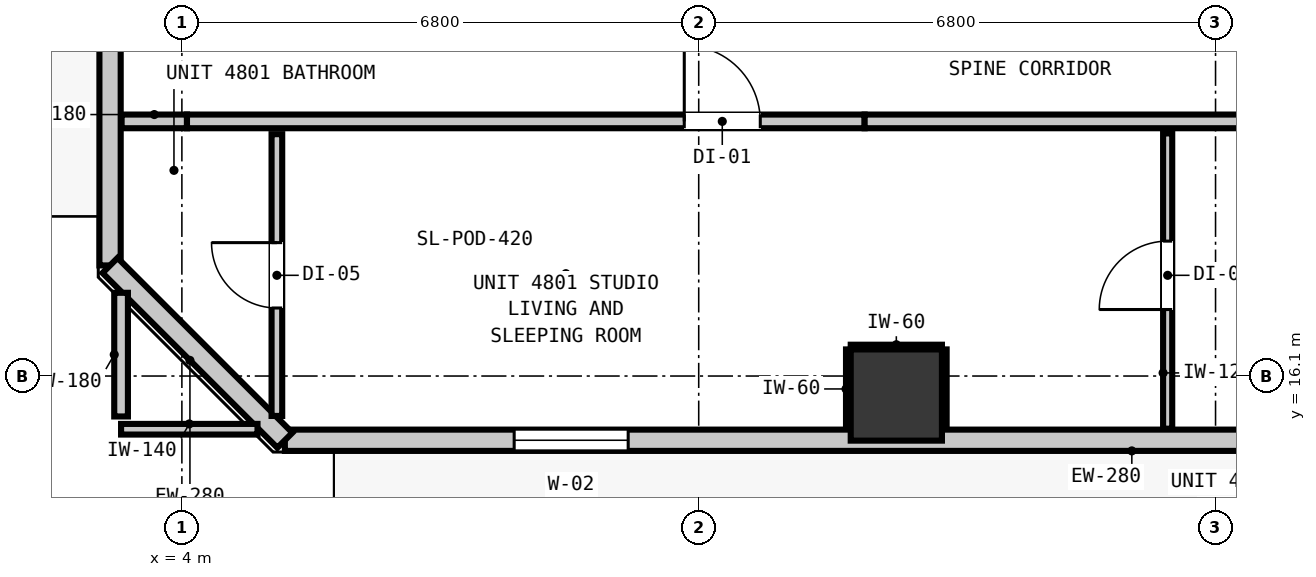
"""IFC4 building model, lengths in metres.
Left out: names, types, materials, properties, quantities, classifications, styles, units other than length and angle.
Written with IfcOpenShell. Run it as: python <this file> out.ifc"""

import sys

from ifc_helpers import new_model, si_unit, direction, frame, frame_2d, origin, origin_2d, place, context, subcontext, project, spatial, rectangle, extrude, element, fill, save


model = new_model("IFC4")
c1 = context("Model", 3, precision=1e-05, world=origin(), true_north=direction((0.0, 1.0)))
c2 = subcontext(c1, "Body", "Model", "MODEL_VIEW")
j1 = project(units=[si_unit("LENGTHUNIT", "METRE"), si_unit("PLANEANGLEUNIT", "RADIAN")], contexts=[c1])
p1 = place(None, origin())
s1 = spatial("IfcSite", under=j1, at=p1, CompositionType="ELEMENT")
p2 = place(p1, origin())
s2 = spatial("IfcBuilding", under=s1, at=p2, CompositionType="ELEMENT")
p3 = place(p2, frame((0.0, 0.0, 165.84)))
s3 = spatial("IfcBuildingStorey", under=s2, at=p3, CompositionType="ELEMENT", Elevation=165.84)
p4 = place(p3, frame((13.4, 15.85, -0.2), z_axis=(0.0, 0.0, 1.0), x_axis=(1.0, 0.0, 0.0)))
e1 = element("IfcColumn", 1, at=p4, inside=s3, PredefinedType="COLUMN", context=c2, shape_type="SweptSolid", body=[
    extrude(rectangle(XDim=1.2, YDim=1.2, at=origin_2d()), origin(), (0.0, 0.0, 1.0), 3.52),
])
p5 = place(p3, frame((3.055, 17.555, 0.0), z_axis=(0.0, 0.0, 1.0), x_axis=(0.0, 1.0, 0.0)))
e2 = element("IfcWall", 2, at=p5, inside=s3, PredefinedType="STANDARD", context=c2, shape_type="SweptSolid", body=[
    extrude(rectangle(XDim=32.29, YDim=0.28, at=frame_2d((16.145, 0.0))), origin(), (0.0, 0.0, 1.0), 3.08),
])
p6 = place(p5, frame((6.871, 0.0, 0.0)))
e3 = element("IfcOpeningElement", 3, at=p6, cuts=e2, PredefinedType="OPENING", context=c2, shape_type="SweptSolid", body=[
    extrude(rectangle(XDim=1.0, YDim=2.15, at=frame_2d((0.5, 1.075))), frame((0.0, 0.15, 0.0), z_axis=(0.0, -1.0, 0.0), x_axis=(1.0, 0.0, 0.0)), (0.0, 0.0, 1.0), 0.3),
])
p7 = place(p5, frame((30.527, 0.0, 0.85)))
e4 = element("IfcOpeningElement", 4, at=p7, cuts=e2, PredefinedType="OPENING", context=c2, shape_type="SweptSolid", body=[
    extrude(rectangle(XDim=1.5, YDim=1.8, at=frame_2d((0.75, 0.9))), frame((0.0, 0.15, 0.0), z_axis=(0.0, -1.0, 0.0), x_axis=(1.0, 0.0, 0.0)), (0.0, 0.0, 1.0), 0.3),
])
p8 = place(p5, frame((8.375, 0.0, 0.85)))
e5 = element("IfcOpeningElement", 5, at=p8, cuts=e2, PredefinedType="OPENING", context=c2, shape_type="SweptSolid", body=[
    extrude(rectangle(XDim=1.5, YDim=1.8, at=frame_2d((0.75, 0.9))), frame((0.0, 0.15, 0.0), z_axis=(0.0, -1.0, 0.0), x_axis=(1.0, 0.0, 0.0)), (0.0, 0.0, 1.0), 0.3),
])
p9 = place(p5, frame((10.762, 0.0, 0.85)))
e6 = element("IfcOpeningElement", 6, at=p9, cuts=e2, PredefinedType="OPENING", context=c2, shape_type="SweptSolid", body=[
    extrude(rectangle(XDim=1.5, YDim=1.8, at=frame_2d((0.75, 0.9))), frame((0.0, 0.15, 0.0), z_axis=(0.0, -1.0, 0.0), x_axis=(1.0, 0.0, 0.0)), (0.0, 0.0, 1.0), 0.3),
])
p10 = place(p5, frame((17.075, 0.0, 0.85)))
e7 = element("IfcOpeningElement", 7, at=p10, cuts=e2, PredefinedType="OPENING", context=c2, shape_type="SweptSolid", body=[
    extrude(rectangle(XDim=1.5, YDim=1.8, at=frame_2d((0.75, 0.9))), frame((0.0, 0.15, 0.0), z_axis=(0.0, -1.0, 0.0), x_axis=(1.0, 0.0, 0.0)), (0.0, 0.0, 1.0), 0.3),
])
p11 = place(p5, frame((20.113, 0.0, 0.85)))
e8 = element("IfcOpeningElement", 8, at=p11, cuts=e2, PredefinedType="OPENING", context=c2, shape_type="SweptSolid", body=[
    extrude(rectangle(XDim=1.05, YDim=1.65, at=frame_2d((0.525, 0.825))), frame((0.0, 0.15, 0.0), z_axis=(0.0, -1.0, 0.0), x_axis=(1.0, 0.0, 0.0)), (0.0, 0.0, 1.0), 0.3),
])
p12 = place(p3, frame((40.445, 15.255, 0.0), z_axis=(0.0, 0.0, 1.0), x_axis=(-1.0, 0.0, 0.0)))
e9 = element("IfcWall", 9, at=p12, inside=s3, PredefinedType="STANDARD", context=c2, shape_type="SweptSolid", body=[
    extrude(rectangle(XDim=35.09, YDim=0.28, at=frame_2d((17.545, 0.0))), origin(), (0.0, 0.0, 1.0), 3.08),
])
p13 = place(p12, frame((0.904, 0.0, 0.0)))
e10 = element("IfcOpeningElement", 10, at=p13, cuts=e9, PredefinedType="OPENING", context=c2, shape_type="SweptSolid", body=[
    extrude(rectangle(XDim=1.0, YDim=2.15, at=frame_2d((0.5, 1.075))), frame((0.0, 0.15, 0.0), z_axis=(0.0, -1.0, 0.0), x_axis=(1.0, 0.0, 0.0)), (0.0, 0.0, 1.0), 0.3),
])
p14 = place(p12, frame((30.573, 0.0, 0.85)))
e11 = element("IfcOpeningElement", 11, at=p14, cuts=e9, PredefinedType="OPENING", context=c2, shape_type="SweptSolid", body=[
    extrude(rectangle(XDim=1.5, YDim=1.8, at=frame_2d((0.75, 0.9))), frame((0.0, 0.15, 0.0), z_axis=(0.0, -1.0, 0.0), x_axis=(1.0, 0.0, 0.0)), (0.0, 0.0, 1.0), 0.3),
])
p15 = place(p12, frame((15.82, 0.0, 0.85)))
e12 = element("IfcOpeningElement", 12, at=p15, cuts=e9, PredefinedType="OPENING", context=c2, shape_type="SweptSolid", body=[
    extrude(rectangle(XDim=1.5, YDim=1.8, at=frame_2d((0.75, 0.9))), frame((0.0, 0.15, 0.0), z_axis=(0.0, -1.0, 0.0), x_axis=(1.0, 0.0, 0.0)), (0.0, 0.0, 1.0), 0.3),
])
p16 = place(p12, frame((6.305, 0.0, 0.85)))
e13 = element("IfcOpeningElement", 13, at=p16, cuts=e9, PredefinedType="OPENING", context=c2, shape_type="SweptSolid", body=[
    extrude(rectangle(XDim=1.5, YDim=1.8, at=frame_2d((0.75, 0.9))), frame((0.0, 0.15, 0.0), z_axis=(0.0, -1.0, 0.0), x_axis=(1.0, 0.0, 0.0)), (0.0, 0.0, 1.0), 0.3),
])
p17 = place(p3, frame((5.355, 15.255, 0.0), z_axis=(0.0, 0.0, 1.0), x_axis=(-0.707106781187, 0.707106781187, 0.0)))
e14 = element("IfcWall", 14, at=p17, inside=s3, PredefinedType="STANDARD", context=c2, shape_type="SweptSolid", body=[
    extrude(rectangle(XDim=3.253, YDim=0.28, at=frame_2d((1.626, 0.0))), origin(), (0.0, 0.0, 1.0), 3.08),
])
p18 = place(p3, frame((3.207, 19.45, 0.0), z_axis=(0.0, 0.0, 1.0), x_axis=(1.0, 0.0, 0.0)))
e15 = element("IfcWall", 15, at=p18, inside=s3, PredefinedType="PARTITIONING", context=c2, shape_type="SweptSolid", body=[
    extrude(rectangle(XDim=0.86, YDim=0.18, at=frame_2d((0.43, 0.0))), origin(), (0.0, 0.0, 1.0), 3.08),
])
p19 = place(p3, frame((4.067, 19.45, 0.0), z_axis=(0.0, 0.0, 1.0), x_axis=(1.0, 0.0, 0.0)))
e16 = element("IfcWall", 16, at=p19, inside=s3, PredefinedType="PARTITIONING", context=c2, shape_type="SweptSolid", body=[
    extrude(rectangle(XDim=8.916, YDim=0.18, at=frame_2d((4.458, 0.0))), origin(), (0.0, 0.0, 1.0), 2.565),
])
p20 = place(p19, frame((6.543, 0.0, 0.0)))
e17 = element("IfcOpeningElement", 17, at=p20, cuts=e16, PredefinedType="OPENING", context=c2, shape_type="SweptSolid", body=[
    extrude(rectangle(XDim=1.0, YDim=2.15, at=frame_2d((0.5, 1.075))), frame((0.0, 0.1, 0.0), z_axis=(0.0, -1.0, 0.0), x_axis=(1.0, 0.0, 0.0)), (0.0, 0.0, 1.0), 0.2),
])
p21 = place(p3, frame((12.983, 19.45, 0.0), z_axis=(0.0, 0.0, 1.0), x_axis=(1.0, 0.0, 0.0)))
e18 = element("IfcWall", 18, at=p21, inside=s3, PredefinedType="PARTITIONING", context=c2, shape_type="SweptSolid", body=[
    extrude(rectangle(XDim=29.61, YDim=0.18, at=frame_2d((14.805, 0.0))), origin(), (0.0, 0.0, 1.0), 3.08),
])
p22 = place(p21, frame((10.392, 0.0, 0.0)))
e19 = element("IfcOpeningElement", 19, at=p22, cuts=e18, PredefinedType="OPENING", context=c2, shape_type="SweptSolid", body=[
    extrude(rectangle(XDim=1.0, YDim=2.15, at=frame_2d((0.5, 1.075))), frame((0.0, 0.1, 0.0), z_axis=(0.0, -1.0, 0.0), x_axis=(1.0, 0.0, 0.0)), (0.0, 0.0, 1.0), 0.2),
])
p23 = place(p21, frame((22.132, 0.0, 0.0)))
e20 = element("IfcOpeningElement", 20, at=p23, cuts=e18, PredefinedType="OPENING", context=c2, shape_type="SweptSolid", body=[
    extrude(rectangle(XDim=1.0, YDim=2.15, at=frame_2d((0.5, 1.075))), frame((0.0, 0.1, 0.0), z_axis=(0.0, -1.0, 0.0), x_axis=(1.0, 0.0, 0.0)), (0.0, 0.0, 1.0), 0.2),
])
p24 = place(p3, frame((3.2, 15.4, 0.0), z_axis=(0.0, 0.0, 1.0), x_axis=(1.0, 0.0, 0.0)))
e21 = element("IfcWall", 21, at=p24, inside=s3, PredefinedType="PARTITIONING", context=c2, shape_type="SweptSolid", body=[
    extrude(rectangle(XDim=1.795, YDim=0.14, at=frame_2d((0.897, 0.0))), origin(), (0.0, 0.0, 1.0), 3.08),
])
p25 = place(p3, frame((3.2, 15.568, 0.0), z_axis=(0.0, 0.0, 1.0), x_axis=(0.0, 1.0, 0.0)))
e22 = element("IfcWall", 22, at=p25, inside=s3, PredefinedType="PARTITIONING", context=c2, shape_type="SweptSolid", body=[
    extrude(rectangle(XDim=1.627, YDim=0.18, at=frame_2d((0.813, 0.0))), origin(), (0.0, 0.0, 1.0), 3.08),
])
p26 = place(p3, frame((5.25, 15.575, 0.0), z_axis=(0.0, 0.0, 1.0), x_axis=(0.0, 1.0, 0.0)))
e23 = element("IfcWall", 23, at=p26, inside=s3, PredefinedType="PARTITIONING", context=c2, shape_type="SweptSolid", body=[
    extrude(rectangle(XDim=3.707, YDim=0.14, at=frame_2d((1.854, 0.0))), origin(), (0.0, 0.0, 1.0), 3.08),
])
p27 = place(p26, frame((1.42, 0.0, 0.0)))
e24 = element("IfcOpeningElement", 24, at=p27, cuts=e23, PredefinedType="OPENING", context=c2, shape_type="SweptSolid", body=[
    extrude(rectangle(XDim=0.86, YDim=2.02, at=frame_2d((0.43, 1.01))), frame((0.0, 0.08, 0.0), z_axis=(0.0, -1.0, 0.0), x_axis=(1.0, 0.0, 0.0)), (0.0, 0.0, 1.0), 0.16),
])
p28 = place(p3, frame((16.97, 15.407, 0.0), z_axis=(0.0, 0.0, 1.0), x_axis=(0.0, 1.0, 0.0)))
e25 = element("IfcWall", 25, at=p28, inside=s3, PredefinedType="PARTITIONING", context=c2, shape_type="SweptSolid", body=[
    extrude(rectangle(XDim=3.885, YDim=0.12, at=frame_2d((1.942, 0.0))), origin(), (0.0, 0.0, 1.0), 3.08),
])
p29 = place(p28, frame((1.568, 0.0, 0.0)))
e26 = element("IfcOpeningElement", 26, at=p29, cuts=e25, PredefinedType="OPENING", context=c2, shape_type="SweptSolid", body=[
    extrude(rectangle(XDim=0.9, YDim=2.1, at=frame_2d((0.45, 1.05))), frame((0.0, 0.07, 0.0), z_axis=(0.0, -1.0, 0.0), x_axis=(1.0, 0.0, 0.0)), (0.0, 0.0, 1.0), 0.14),
])
p30 = place(p3, frame((12.8, 16.482, 0.0), z_axis=(0.0, 0.0, 1.0), x_axis=(1.0, 0.0, 0.0)))
e27 = element("IfcWall", 27, at=p30, inside=s3, PredefinedType="PARTITIONING", context=c2, shape_type="SweptSolid", body=[
    extrude(rectangle(XDim=1.2, YDim=0.06, at=frame_2d((0.6, 0.0))), origin(), (0.0, 0.0, 1.0), 1.45),
])
for number, where, z_axis, x_axis in (
    (28, (12.768, 15.41, 0.0), (0.0, 0.0, 1.0), (0.0, 1.0, 0.0)),
    (29, (14.032, 15.41, 0.0), (0.0, 0.0, 1.0), (0.0, 1.0, 0.0)),
):
    element("IfcWall", number, at=place(p3, frame(where, z_axis=z_axis, x_axis=x_axis)), inside=s3, PredefinedType="PARTITIONING", context=c2, shape_type="SweptSolid", body=[
        extrude(rectangle(XDim=1.04, YDim=0.06, at=frame_2d((0.52, 0.0))), origin(), (0.0, 0.0, 1.0), 1.45),
    ])
p31 = place(p14, origin())
e30 = element("IfcWindow", 30, at=p31, inside=s3, PartitioningType="SINGLE_PANEL", PredefinedType="WINDOW", context=c2, shape_type="SweptSolid", body=[
    extrude(rectangle(XDim=1.5, YDim=1.8, at=frame_2d((0.75, 0.9))), frame((0.0, 0.03, 0.0), z_axis=(0.0, -1.0, 0.0), x_axis=(1.0, 0.0, 0.0)), (0.0, 0.0, 1.0), 0.06),
])
fill(e11, e30)
p32 = place(p20, origin())
e31 = element("IfcDoor", 31, at=p32, inside=s3, OperationType="SINGLE_SWING_LEFT", PredefinedType="DOOR", context=c2, shape_type="SweptSolid", body=[
    extrude(rectangle(XDim=1.0, YDim=2.15, at=frame_2d((0.5, 1.075))), frame((0.0, 0.025, 0.0), z_axis=(0.0, -1.0, 0.0), x_axis=(1.0, 0.0, 0.0)), (0.0, 0.0, 1.0), 0.05),
])
fill(e17, e31)
p33 = place(p27, origin())
e32 = element("IfcDoor", 32, at=p33, inside=s3, OperationType="SINGLE_SWING_RIGHT", PredefinedType="DOOR", context=c2, shape_type="SweptSolid", body=[
    extrude(rectangle(XDim=0.86, YDim=2.02, at=frame_2d((0.43, 1.01))), frame((0.0, 0.025, 0.0), z_axis=(0.0, -1.0, 0.0), x_axis=(1.0, 0.0, 0.0)), (0.0, 0.0, 1.0), 0.05),
])
fill(e24, e32)
p34 = place(p29, origin())
e33 = element("IfcDoor", 33, at=p34, inside=s3, OperationType="SINGLE_SWING_LEFT", PredefinedType="DOOR", context=c2, shape_type="SweptSolid", body=[
    extrude(rectangle(XDim=0.9, YDim=2.1, at=frame_2d((0.45, 1.05))), frame((0.0, 0.025, 0.0), z_axis=(0.0, -1.0, 0.0), x_axis=(1.0, 0.0, 0.0)), (0.0, 0.0, 1.0), 0.05),
])
fill(e26, e33)
save(model, sys.argv[1])
